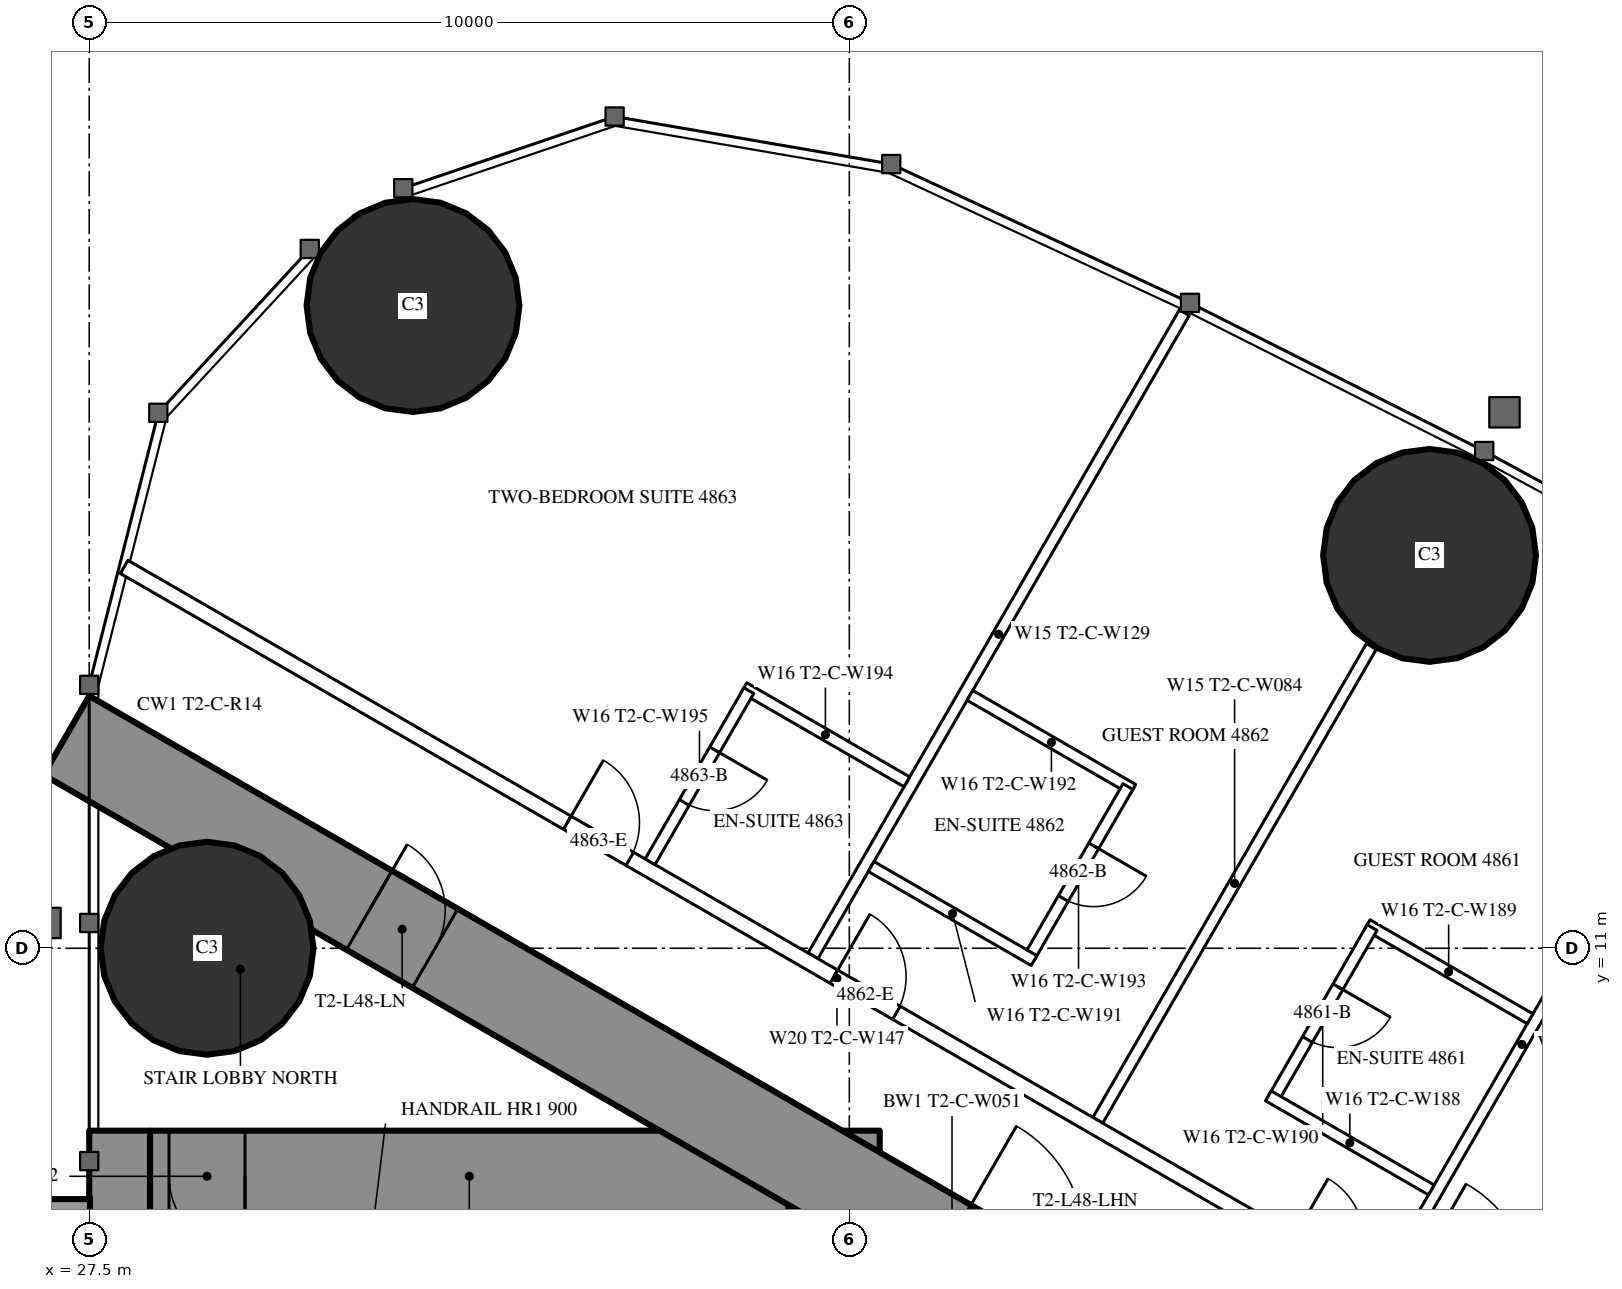
"""IFC4 building model, lengths in metres.
Left out: names, types, materials, properties, quantities, classifications, styles, units other than length and angle.
Written with IfcOpenShell. Run it as: python <this file> out.ifc"""

import sys

from ifc_helpers import new_model, si_unit, direction, frame, frame_2d, origin, origin_2d, place, context, subcontext, project, spatial, rectangle, circle, extrude, element, fill, save


model = new_model("IFC4")
c1 = context("Model", 3, precision=1e-05, world=origin(), true_north=direction((0.0, 1.0)))
c2 = subcontext(c1, "Body", "Model", "MODEL_VIEW")
j1 = project(units=[si_unit("LENGTHUNIT", "METRE"), si_unit("PLANEANGLEUNIT", "RADIAN")], contexts=[c1])
p1 = place(None, origin())
s1 = spatial("IfcSite", under=j1, at=p1, CompositionType="ELEMENT")
p2 = place(p1, origin())
s2 = spatial("IfcBuilding", under=s1, at=p2, CompositionType="ELEMENT")
p3 = place(p2, frame((0.0, 0.0, 180.8)))
s3 = spatial("IfcBuildingStorey", under=s2, at=p3, CompositionType="ELEMENT", Elevation=180.8)
for number, where, z_axis, x_axis in (
    (1, (31.76, 19.456, 0.0), (0.0, 0.0, 1.0), (1.0, 0.0, 0.0)),
    (2, (29.05, 11.0, 0.0), (0.0, 0.0, 1.0), (1.0, 0.0, 0.0)),
    (3, (45.134, 16.168, 0.0), (0.0, 0.0, 1.0), (1.0, 0.0, 0.0)),
):
    element("IfcColumn", number, at=place(p3, frame(where, z_axis=z_axis, x_axis=x_axis)), inside=s3, PredefinedType="COLUMN", context=c2, shape_type="SweptSolid", body=[
        extrude(circle(Radius=1.4, at=origin_2d()), origin(), (0.0, 0.0, 1.0), 3.5),
    ])
p4 = place(p3, frame((27.9, -8.6, 0.0), z_axis=(0.0, 0.0, 1.0), x_axis=(0.0, 1.0, 0.0)))
e4 = element("IfcWall", 4, at=p4, inside=s3, PredefinedType="SHEAR", context=c2, shape_type="SweptSolid", body=[
    extrude(rectangle(XDim=17.2, YDim=0.8, at=frame_2d((8.6, 0.0))), origin(), (0.0, 0.0, 1.0), 3.5),
])
p5 = place(p4, frame((2.45, 0.0, 0.6)))
e5 = element("IfcOpeningElement", 5, at=p5, cuts=e4, PredefinedType="OPENING", context=c2, shape_type="SweptSolid", body=[
    extrude(rectangle(XDim=0.6, YDim=2.1, at=frame_2d((0.3, 1.05))), frame((0.0, 0.41, 0.0), z_axis=(0.0, -1.0, 0.0), x_axis=(1.0, 0.0, 0.0)), (0.0, 0.0, 1.0), 0.82),
])
p6 = place(p4, frame((14.15, 0.0, 0.6)))
e6 = element("IfcOpeningElement", 6, at=p6, cuts=e4, PredefinedType="OPENING", context=c2, shape_type="SweptSolid", body=[
    extrude(rectangle(XDim=0.6, YDim=2.1, at=frame_2d((0.3, 1.05))), frame((0.0, 0.41, 0.0), z_axis=(0.0, -1.0, 0.0), x_axis=(1.0, 0.0, 0.0)), (0.0, 0.0, 1.0), 0.82),
])
p7 = place(p3, frame((37.3, -8.6, 0.0), z_axis=(0.0, 0.0, 1.0), x_axis=(0.0, 1.0, 0.0)))
e7 = element("IfcWall", 7, at=p7, inside=s3, PredefinedType="SHEAR", context=c2, shape_type="SweptSolid", body=[
    extrude(rectangle(XDim=17.2, YDim=1.2, at=frame_2d((8.6, 0.0))), origin(), (0.0, 0.0, 1.0), 3.5),
])
p8 = place(p7, frame((7.7, 0.0, 0.0)))
e8 = element("IfcOpeningElement", 8, at=p8, cuts=e7, PredefinedType="OPENING", context=c2, shape_type="SweptSolid", body=[
    extrude(rectangle(XDim=1.8, YDim=2.2, at=frame_2d((0.9, 1.1))), frame((0.0, 0.61, 0.0), z_axis=(0.0, -1.0, 0.0), x_axis=(1.0, 0.0, 0.0)), (0.0, 0.0, 1.0), 1.22),
])
p9 = place(p3, frame((28.3, 8.0, 0.0), z_axis=(0.0, 0.0, 1.0), x_axis=(1.0, 0.0, 0.0)))
e9 = element("IfcWall", 9, at=p9, inside=s3, PredefinedType="SHEAR", context=c2, shape_type="SweptSolid", body=[
    extrude(rectangle(XDim=8.4, YDim=1.2, at=frame_2d((4.2, 0.0))), origin(), (0.0, 0.0, 1.0), 3.5),
])
p10 = place(p9, frame((0.25, 0.0, 0.0)))
e10 = element("IfcOpeningElement", 10, at=p10, cuts=e9, PredefinedType="OPENING", context=c2, shape_type="SweptSolid", body=[
    extrude(rectangle(XDim=1.0, YDim=2.2, at=frame_2d((0.5, 1.1))), frame((0.0, 0.61, 0.0), z_axis=(0.0, -1.0, 0.0), x_axis=(1.0, 0.0, 0.0)), (0.0, 0.0, 1.0), 1.22),
])
p11 = place(p3, frame((27.2, 13.8, 0.0), z_axis=(0.0, 0.0, 1.0), x_axis=(0.866024515034, -0.500001539357, 0.0)))
e11 = element("IfcWall", 11, at=p11, inside=s3, PredefinedType="SHEAR", context=c2, shape_type="SweptSolid", body=[
    extrude(rectangle(XDim=26.907, YDim=1.2, at=frame_2d((13.454, 0.0))), origin(), (0.0, 0.0, 1.0), 3.5),
])
p12 = place(p11, frame((4.6, 0.0, 0.0)))
e12 = element("IfcOpeningElement", 12, at=p12, cuts=e11, PredefinedType="OPENING", context=c2, shape_type="SweptSolid", body=[
    extrude(rectangle(XDim=1.0, YDim=2.2, at=frame_2d((0.5, 1.1))), frame((0.0, 0.61, 0.0), z_axis=(0.0, -1.0, 0.0), x_axis=(1.0, 0.0, 0.0)), (0.0, 0.0, 1.0), 1.22),
])
p13 = place(p11, frame((13.395, 0.0, 0.0)))
e13 = element("IfcOpeningElement", 13, at=p13, cuts=e11, PredefinedType="OPENING", context=c2, shape_type="SweptSolid", body=[
    extrude(rectangle(XDim=1.8, YDim=2.2, at=frame_2d((0.9, 1.1))), frame((0.0, 0.61, 0.0), z_axis=(0.0, -1.0, 0.0), x_axis=(1.0, 0.0, 0.0)), (0.0, 0.0, 1.0), 1.22),
])
p14 = place(p3, frame((37.022, 10.9, 0.0), z_axis=(0.0, 0.0, 1.0), x_axis=(0.499998620953, 0.866026199976, 0.0)))
e14 = element("IfcWall", 14, at=p14, inside=s3, PredefinedType="PARTITIONING", context=c2, shape_type="SweptSolid", body=[
    extrude(rectangle(XDim=9.77, YDim=0.15, at=frame_2d((4.885, 0.0))), origin(), (0.0, 0.0, 1.0), 3.25),
])
p15 = place(p3, frame((40.769, 8.737, 0.0), z_axis=(0.0, 0.0, 1.0), x_axis=(0.500013115284, 0.866017831539, 0.0)))
e15 = element("IfcWall", 15, at=p15, inside=s3, PredefinedType="PARTITIONING", context=c2, shape_type="SweptSolid", body=[
    extrude(rectangle(XDim=7.198, YDim=0.15, at=frame_2d((3.599, 0.0))), origin(), (0.0, 0.0, 1.0), 2.3),
])
p16 = place(p3, frame((44.521, 6.571, 0.0), z_axis=(0.0, 0.0, 1.0), x_axis=(0.500020376429, 0.866013639128, 0.0)))
e16 = element("IfcWall", 16, at=p16, inside=s3, PredefinedType="PARTITIONING", context=c2, shape_type="SweptSolid", body=[
    extrude(rectangle(XDim=7.306, YDim=0.15, at=frame_2d((3.653, 0.0))), origin(), (0.0, 0.0, 1.0), 2.3),
])
p17 = place(p3, frame((27.959, 16.017, 0.0), z_axis=(0.0, 0.0, 1.0), x_axis=(0.866027146794, -0.499996981007, 0.0)))
e17 = element("IfcWall", 17, at=p17, inside=s3, PredefinedType="PARTITIONING", context=c2, shape_type="SweptSolid", body=[
    extrude(rectangle(XDim=21.657, YDim=0.2, at=frame_2d((10.829, 0.0))), origin(), (0.0, 0.0, 1.0), 3.25),
])
p18 = place(p17, frame((17.741, 0.0, 0.0)))
e18 = element("IfcOpeningElement", 18, at=p18, cuts=e17, PredefinedType="OPENING", context=c2, shape_type="SweptSolid", body=[
    extrude(rectangle(XDim=0.95, YDim=2.2, at=frame_2d((0.475, 1.1))), frame((0.0, 0.11, 0.0), z_axis=(0.0, -1.0, 0.0), x_axis=(1.0, 0.0, 0.0)), (0.0, 0.0, 1.0), 0.22),
])
p19 = place(p17, frame((10.782, 0.0, 0.0)))
e19 = element("IfcOpeningElement", 19, at=p19, cuts=e17, PredefinedType="OPENING", context=c2, shape_type="SweptSolid", body=[
    extrude(rectangle(XDim=0.95, YDim=2.2, at=frame_2d((0.475, 1.1))), frame((0.0, 0.11, 0.0), z_axis=(0.0, -1.0, 0.0), x_axis=(1.0, 0.0, 0.0)), (0.0, 0.0, 1.0), 0.22),
])
p20 = place(p17, frame((6.732, 0.0, 0.0)))
e20 = element("IfcOpeningElement", 20, at=p20, cuts=e17, PredefinedType="OPENING", context=c2, shape_type="SweptSolid", body=[
    extrude(rectangle(XDim=0.95, YDim=2.2, at=frame_2d((0.475, 1.1))), frame((0.0, 0.11, 0.0), z_axis=(0.0, -1.0, 0.0), x_axis=(1.0, 0.0, 0.0)), (0.0, 0.0, 1.0), 0.22),
])
p21 = place(p17, frame((19.349, 0.0, 0.0)))
e21 = element("IfcOpeningElement", 21, at=p21, cuts=e17, PredefinedType="OPENING", context=c2, shape_type="SweptSolid", body=[
    extrude(rectangle(XDim=1.8, YDim=2.2, at=frame_2d((0.9, 1.1))), frame((0.0, 0.11, 0.0), z_axis=(0.0, -1.0, 0.0), x_axis=(1.0, 0.0, 0.0)), (0.0, 0.0, 1.0), 0.22),
])
p22 = place(p3, frame((44.313, 11.31, 0.0), z_axis=(0.0, 0.0, 1.0), x_axis=(0.866031185235, -0.4999899861, 0.0)))
e22 = element("IfcWall", 22, at=p22, inside=s3, PredefinedType="PARTITIONING", context=c2, shape_type="SweptSolid", body=[
    extrude(rectangle(XDim=2.475, YDim=0.15, at=frame_2d((1.238, 0.0))), origin(), (0.0, 0.0, 1.0), 3.25),
])
p23 = place(p3, frame((43.078, 9.021, 0.0), z_axis=(0.0, 0.0, 1.0), x_axis=(0.49997716683, 0.86603858612, 0.0)))
e23 = element("IfcWall", 23, at=p23, inside=s3, PredefinedType="PARTITIONING", context=c2, shape_type="SweptSolid", body=[
    extrude(rectangle(XDim=2.6, YDim=0.15, at=frame_2d((1.3, 0.0))), origin(), (0.0, 0.0, 1.0), 3.25),
])
p24 = place(p23, frame((0.9, 0.0, 0.0)))
e24 = element("IfcOpeningElement", 24, at=p24, cuts=e23, PredefinedType="OPENING", context=c2, shape_type="SweptSolid", body=[
    extrude(rectangle(XDim=0.8, YDim=2.2, at=frame_2d((0.4, 1.1))), frame((0.0, 0.085, 0.0), z_axis=(0.0, -1.0, 0.0), x_axis=(1.0, 0.0, 0.0)), (0.0, 0.0, 1.0), 0.17),
])
p25 = place(p3, frame((43.013, 9.058, 0.0), z_axis=(0.0, 0.0, 1.0), x_axis=(0.866006523861, -0.500032699561, 0.0)))
e25 = element("IfcWall", 25, at=p25, inside=s3, PredefinedType="PARTITIONING", context=c2, shape_type="SweptSolid", body=[
    extrude(rectangle(XDim=2.475, YDim=0.15, at=frame_2d((1.237, 0.0))), origin(), (0.0, 0.0, 1.0), 2.45),
])
p26 = place(p3, frame((39.087, 14.327, 0.0), z_axis=(0.0, 0.0, 1.0), x_axis=(0.866006523861, -0.500032699561, 0.0)))
e26 = element("IfcWall", 26, at=p26, inside=s3, PredefinedType="PARTITIONING", context=c2, shape_type="SweptSolid", body=[
    extrude(rectangle(XDim=2.475, YDim=0.15, at=frame_2d((1.237, 0.0))), origin(), (0.0, 0.0, 1.0), 3.25),
])
p27 = place(p3, frame((39.865, 10.875, 0.0), z_axis=(0.0, 0.0, 1.0), x_axis=(0.500047596559, 0.865997922154, 0.0)))
e27 = element("IfcWall", 27, at=p27, inside=s3, PredefinedType="PARTITIONING", context=c2, shape_type="SweptSolid", body=[
    extrude(rectangle(XDim=2.6, YDim=0.15, at=frame_2d((1.3, 0.0))), origin(), (0.0, 0.0, 1.0), 3.25),
])
p28 = place(p27, frame((0.9, 0.0, 0.0)))
e28 = element("IfcOpeningElement", 28, at=p28, cuts=e27, PredefinedType="OPENING", context=c2, shape_type="SweptSolid", body=[
    extrude(rectangle(XDim=0.8, YDim=2.2, at=frame_2d((0.4, 1.1))), frame((0.0, 0.085, 0.0), z_axis=(0.0, -1.0, 0.0), x_axis=(1.0, 0.0, 0.0)), (0.0, 0.0, 1.0), 0.17),
])
for number, where, z_axis, x_axis in (
    (29, (37.787, 12.075, 0.0), (0.0, 0.0, 1.0), (0.866, -0.5, 0.0)),
    (30, (36.114, 14.427, 0.0), (0.0, 0.0, 1.0), (0.866, -0.5, 0.0)),
):
    element("IfcWall", number, at=place(p3, frame(where, z_axis=z_axis, x_axis=x_axis)), inside=s3, PredefinedType="PARTITIONING", context=c2, shape_type="SweptSolid", body=[
        extrude(rectangle(XDim=2.475, YDim=0.15, at=frame_2d((1.237, 0.0))), origin(), (0.0, 0.0, 1.0), 3.25),
    ])
p29 = place(p3, frame((34.879, 12.138, 0.0), z_axis=(0.0, 0.0, 1.0), x_axis=(0.500006934395, 0.866021400173, 0.0)))
e31 = element("IfcWall", 31, at=p29, inside=s3, PredefinedType="PARTITIONING", context=c2, shape_type="SweptSolid", body=[
    extrude(rectangle(XDim=2.6, YDim=0.15, at=frame_2d((1.3, 0.0))), origin(), (0.0, 0.0, 1.0), 3.25),
])
p30 = place(p29, frame((0.9, 0.0, 0.0)))
e32 = element("IfcOpeningElement", 32, at=p30, cuts=e31, PredefinedType="OPENING", context=c2, shape_type="SweptSolid", body=[
    extrude(rectangle(XDim=0.8, YDim=2.2, at=frame_2d((0.4, 1.1))), frame((0.0, 0.085, 0.0), z_axis=(0.0, -1.0, 0.0), x_axis=(1.0, 0.0, 0.0)), (0.0, 0.0, 1.0), 0.17),
])
p31 = place(p24, origin())
e33 = element("IfcDoor", 33, at=p31, inside=s3, OperationType="SINGLE_SWING_RIGHT", PredefinedType="DOOR", context=c2, shape_type="SweptSolid", body=[
    extrude(rectangle(XDim=0.8, YDim=2.2, at=frame_2d((0.4, 1.1))), frame((0.0, 0.025, 0.0), z_axis=(0.0, -1.0, 0.0), x_axis=(1.0, 0.0, 0.0)), (0.0, 0.0, 1.0), 0.05),
])
fill(e24, e33)
p32 = place(p28, origin())
e34 = element("IfcDoor", 34, at=p32, inside=s3, OperationType="SINGLE_SWING_RIGHT", PredefinedType="DOOR", context=c2, shape_type="SweptSolid", body=[
    extrude(rectangle(XDim=0.8, YDim=2.2, at=frame_2d((0.4, 1.1))), frame((0.0, 0.025, 0.0), z_axis=(0.0, -1.0, 0.0), x_axis=(1.0, 0.0, 0.0)), (0.0, 0.0, 1.0), 0.05),
])
fill(e28, e34)
p33 = place(p19, origin())
e35 = element("IfcDoor", 35, at=p33, inside=s3, OperationType="SINGLE_SWING_LEFT", PredefinedType="DOOR", context=c2, shape_type="SweptSolid", body=[
    extrude(rectangle(XDim=0.95, YDim=2.2, at=frame_2d((0.475, 1.1))), frame((0.0, 0.025, 0.0), z_axis=(0.0, -1.0, 0.0), x_axis=(1.0, 0.0, 0.0)), (0.0, 0.0, 1.0), 0.05),
])
fill(e19, e35)
p34 = place(p30, origin())
e36 = element("IfcDoor", 36, at=p34, inside=s3, OperationType="SINGLE_SWING_RIGHT", PredefinedType="DOOR", context=c2, shape_type="SweptSolid", body=[
    extrude(rectangle(XDim=0.8, YDim=2.2, at=frame_2d((0.4, 1.1))), frame((0.0, 0.025, 0.0), z_axis=(0.0, -1.0, 0.0), x_axis=(1.0, 0.0, 0.0)), (0.0, 0.0, 1.0), 0.05),
])
fill(e32, e36)
p35 = place(p20, origin())
e37 = element("IfcDoor", 37, at=p35, inside=s3, OperationType="SINGLE_SWING_LEFT", PredefinedType="DOOR", context=c2, shape_type="SweptSolid", body=[
    extrude(rectangle(XDim=0.95, YDim=2.2, at=frame_2d((0.475, 1.1))), frame((0.0, 0.025, 0.0), z_axis=(0.0, -1.0, 0.0), x_axis=(1.0, 0.0, 0.0)), (0.0, 0.0, 1.0), 0.05),
])
fill(e20, e37)
p36 = place(p12, origin())
e38 = element("IfcDoor", 38, at=p36, inside=s3, OperationType="SINGLE_SWING_LEFT", PredefinedType="DOOR", context=c2, shape_type="SweptSolid", body=[
    extrude(rectangle(XDim=1.0, YDim=2.2, at=frame_2d((0.5, 1.1))), frame((0.0, 0.025, 0.0), z_axis=(0.0, -1.0, 0.0), x_axis=(1.0, 0.0, 0.0)), (0.0, 0.0, 1.0), 0.05),
])
fill(e12, e38)
p37 = place(p10, origin())
e39 = element("IfcDoor", 39, at=p37, inside=s3, OperationType="SINGLE_SWING_RIGHT", PredefinedType="DOOR", context=c2, shape_type="SweptSolid", body=[
    extrude(rectangle(XDim=1.0, YDim=2.2, at=frame_2d((0.5, 1.1))), frame((0.0, 0.025, 0.0), z_axis=(0.0, -1.0, 0.0), x_axis=(1.0, 0.0, 0.0)), (0.0, 0.0, 1.0), 0.05),
])
fill(e10, e39)
save(model, sys.argv[1])
